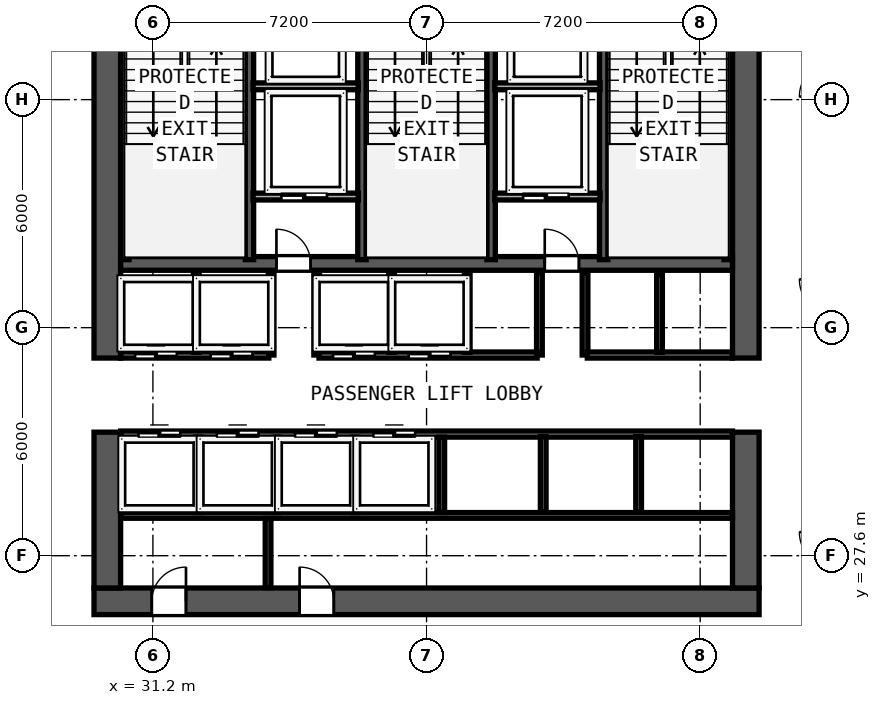
"""IFC4 building model, lengths in metres.
Left out: names, types, materials, properties, quantities, classifications, styles, units other than length and angle.
Written with IfcOpenShell. Run it as: python <this file> out.ifc"""

import sys

from ifc_helpers import new_model, si_unit, direction, frame, frame_2d, origin, place, context, subcontext, project, spatial, rectangle, extrude, element, fill, save


model = new_model("IFC4")
c1 = context("Model", 3, precision=1e-05, world=origin(), true_north=direction((0.0, 1.0)))
c2 = subcontext(c1, "Body", "Model", "MODEL_VIEW")
j1 = project(units=[si_unit("LENGTHUNIT", "METRE"), si_unit("PLANEANGLEUNIT", "RADIAN")], contexts=[c1])
p1 = place(None, origin())
s1 = spatial("IfcSite", under=j1, at=p1, CompositionType="ELEMENT")
p2 = place(p1, origin())
s2 = spatial("IfcBuilding", under=s1, at=p2, CompositionType="ELEMENT")
p3 = place(p2, frame((0.0, 0.0, 98.4)))
s3 = spatial("IfcBuildingStorey", under=s2, at=p3, CompositionType="ELEMENT", Elevation=98.4)
p4 = place(p3, frame((29.65, 26.4, 0.0), z_axis=(0.0, 0.0, 1.0), x_axis=(1.0, 0.0, 0.0)))
e1 = element("IfcWall", 1, at=p4, inside=s3, PredefinedType="SHEAR", context=c2, shape_type="SweptSolid", body=[
    extrude(rectangle(XDim=17.5, YDim=0.7, at=frame_2d((8.75, 0.0))), origin(), (0.0, 0.0, 1.0), 3.6),
])
p5 = place(p4, frame((2.42, 0.0, 0.0), z_axis=(0.0, 0.0, 1.0), x_axis=(-1.0, 0.0, 0.0)))
e2 = element("IfcOpeningElement", 2, at=p5, cuts=e1, PredefinedType="OPENING", context=c2, shape_type="SweptSolid", body=[
    extrude(rectangle(XDim=0.9, YDim=2.1, at=frame_2d((0.45, 1.05))), frame((0.0, 0.36, 0.0), z_axis=(0.0, -1.0, 0.0), x_axis=(1.0, 0.0, 0.0)), (0.0, 0.0, 1.0), 0.72),
])
p6 = place(p4, frame((6.31, 0.0, 0.0), z_axis=(0.0, 0.0, 1.0), x_axis=(-1.0, 0.0, 0.0)))
e3 = element("IfcOpeningElement", 3, at=p6, cuts=e1, PredefinedType="OPENING", context=c2, shape_type="SweptSolid", body=[
    extrude(rectangle(XDim=0.9, YDim=2.1, at=frame_2d((0.45, 1.05))), frame((0.0, 0.36, 0.0), z_axis=(0.0, -1.0, 0.0), x_axis=(1.0, 0.0, 0.0)), (0.0, 0.0, 1.0), 0.72),
])
p7 = place(p3, frame((30.0, 26.75, 0.0), z_axis=(0.0, 0.0, 1.0), x_axis=(0.0, 1.0, 0.0)))
e4 = element("IfcWall", 4, at=p7, inside=s3, PredefinedType="SHEAR", context=c2, shape_type="SweptSolid", body=[
    extrude(rectangle(XDim=4.1, YDim=0.7, at=frame_2d((2.05, 0.0))), origin(), (0.0, 0.0, 1.0), 3.6),
])
p8 = place(p3, frame((30.0, 32.8, 0.0), z_axis=(0.0, 0.0, 1.0), x_axis=(0.0, 1.0, 0.0)))
e5 = element("IfcWall", 5, at=p8, inside=s3, PredefinedType="SHEAR", context=c2, shape_type="SweptSolid", body=[
    extrude(rectangle(XDim=10.05, YDim=0.7, at=frame_2d((5.025, 0.0))), origin(), (0.0, 0.0, 1.0), 3.6),
])
p9 = place(p3, frame((46.8, 26.75, 0.0), z_axis=(0.0, 0.0, 1.0), x_axis=(0.0, 1.0, 0.0)))
e6 = element("IfcWall", 6, at=p9, inside=s3, PredefinedType="SHEAR", context=c2, shape_type="SweptSolid", body=[
    extrude(rectangle(XDim=4.1, YDim=0.7, at=frame_2d((2.05, 0.0))), origin(), (0.0, 0.0, 1.0), 3.6),
])
p10 = place(p3, frame((46.8, 32.8, 0.0), z_axis=(0.0, 0.0, 1.0), x_axis=(0.0, 1.0, 0.0)))
e7 = element("IfcWall", 7, at=p10, inside=s3, PredefinedType="SHEAR", context=c2, shape_type="SweptSolid", body=[
    extrude(rectangle(XDim=10.05, YDim=0.7, at=frame_2d((5.025, 0.0))), origin(), (0.0, 0.0, 1.0), 3.6),
])
p11 = place(p3, frame((30.35, 35.29, 0.0), z_axis=(0.0, 0.0, 1.0), x_axis=(1.0, 0.0, 0.0)))
e8 = element("IfcWall", 8, at=p11, inside=s3, PredefinedType="SHEAR", context=c2, shape_type="SweptSolid", body=[
    extrude(rectangle(XDim=16.1, YDim=0.36, at=frame_2d((8.05, 0.0))), origin(), (0.0, 0.0, 1.0), 3.6),
])
p12 = place(p11, frame((5.0, 0.0, 0.0), z_axis=(0.0, 0.0, 1.0), x_axis=(-1.0, 0.0, 0.0)))
e9 = element("IfcOpeningElement", 9, at=p12, cuts=e8, PredefinedType="OPENING", context=c2, shape_type="SweptSolid", body=[
    extrude(rectangle(XDim=0.9, YDim=2.1, at=frame_2d((0.45, 1.05))), frame((0.0, 0.19, 0.0), z_axis=(0.0, -1.0, 0.0), x_axis=(1.0, 0.0, 0.0)), (0.0, 0.0, 1.0), 0.38),
])
p13 = place(p11, frame((12.06, 0.0, 0.0), z_axis=(0.0, 0.0, 1.0), x_axis=(-1.0, 0.0, 0.0)))
e10 = element("IfcOpeningElement", 10, at=p13, cuts=e8, PredefinedType="OPENING", context=c2, shape_type="SweptSolid", body=[
    extrude(rectangle(XDim=0.9, YDim=2.1, at=frame_2d((0.45, 1.05))), frame((0.0, 0.19, 0.0), z_axis=(0.0, -1.0, 0.0), x_axis=(1.0, 0.0, 0.0)), (0.0, 0.0, 1.0), 0.38),
])
for number, where, z_axis, x_axis in (
    (11, (30.462, 35.39, 0.0), (0.0, 0.0, 1.0), (0.0, 1.0, 0.0)),
    (12, (33.74, 35.39, 0.0), (0.0, 0.0, 1.0), (0.0, 1.0, 0.0)),
    (13, (36.7, 35.39, 0.0), (0.0, 0.0, 1.0), (0.0, 1.0, 0.0)),
    (14, (40.1, 35.39, 0.0), (0.0, 0.0, 1.0), (0.0, 1.0, 0.0)),
    (15, (43.06, 35.39, 0.0), (0.0, 0.0, 1.0), (0.0, 1.0, 0.0)),
    (16, (46.338, 35.39, 0.0), (0.0, 0.0, 1.0), (0.0, 1.0, 0.0)),
):
    element("IfcWall", number, at=place(p3, frame(where, z_axis=z_axis, x_axis=x_axis)), inside=s3, PredefinedType="SHEAR", context=c2, shape_type="SweptSolid", body=[
        extrude(rectangle(XDim=7.46, YDim=0.22, at=frame_2d((3.73, 0.0))), origin(), (0.0, 0.0, 1.0), 3.6),
    ])
for number, where, z_axis, x_axis in (
    (17, (33.835, 39.95, 0.0), (0.0, 0.0, 1.0), (1.0, 0.0, 0.0)),
    (18, (40.195, 39.95, 0.0), (0.0, 0.0, 1.0), (1.0, 0.0, 0.0)),
):
    element("IfcWall", number, at=place(p3, frame(where, z_axis=z_axis, x_axis=x_axis)), inside=s3, PredefinedType="SOLIDWALL", context=c2, shape_type="SweptSolid", body=[
        extrude(rectangle(XDim=2.77, YDim=0.18, at=frame_2d((1.385, 0.0))), origin(), (0.0, 0.0, 1.0), 3.6),
    ])
p14 = place(p3, frame((33.835, 37.05, 0.0), z_axis=(0.0, 0.0, 1.0), x_axis=(1.0, 0.0, 0.0)))
e19 = element("IfcWall", 19, at=p14, inside=s3, PredefinedType="SOLIDWALL", context=c2, shape_type="SweptSolid", body=[
    extrude(rectangle(XDim=2.77, YDim=0.18, at=frame_2d((1.385, 0.0))), origin(), (0.0, 0.0, 1.0), 3.6),
])
p15 = place(p14, frame((1.945, 0.0, 0.0), z_axis=(0.0, 0.0, 1.0), x_axis=(-1.0, 0.0, 0.0)))
e20 = element("IfcOpeningElement", 20, at=p15, cuts=e19, PredefinedType="OPENING", context=c2, shape_type="SweptSolid", body=[
    extrude(rectangle(XDim=1.2, YDim=2.2, at=frame_2d((0.6, 1.1))), frame((0.0, 0.1, 0.0), z_axis=(0.0, -1.0, 0.0), x_axis=(1.0, 0.0, 0.0)), (0.0, 0.0, 1.0), 0.2),
])
for number, where, z_axis, x_axis in (
    (21, (34.31, 32.88, 0.0), (0.0, 0.0, 1.0), (0.0, 1.0, 0.0)),
    (22, (35.51, 32.88, 0.0), (0.0, 0.0, 1.0), (0.0, 1.0, 0.0)),
):
    element("IfcWall", number, at=place(p3, frame(where, z_axis=z_axis, x_axis=x_axis)), inside=s3, PredefinedType="SOLIDWALL", context=c2, shape_type="SweptSolid", body=[
        extrude(rectangle(XDim=2.17, YDim=0.15, at=frame_2d((1.085, 0.0))), origin(), (0.0, 0.0, 1.0), 3.6),
    ])
p16 = place(p3, frame((40.195, 37.05, 0.0), z_axis=(0.0, 0.0, 1.0), x_axis=(1.0, 0.0, 0.0)))
e23 = element("IfcWall", 23, at=p16, inside=s3, PredefinedType="SOLIDWALL", context=c2, shape_type="SweptSolid", body=[
    extrude(rectangle(XDim=2.77, YDim=0.18, at=frame_2d((1.385, 0.0))), origin(), (0.0, 0.0, 1.0), 3.6),
])
p17 = place(p16, frame((1.945, 0.0, 0.0), z_axis=(0.0, 0.0, 1.0), x_axis=(-1.0, 0.0, 0.0)))
e24 = element("IfcOpeningElement", 24, at=p17, cuts=e23, PredefinedType="OPENING", context=c2, shape_type="SweptSolid", body=[
    extrude(rectangle(XDim=1.2, YDim=2.2, at=frame_2d((0.6, 1.1))), frame((0.0, 0.1, 0.0), z_axis=(0.0, -1.0, 0.0), x_axis=(1.0, 0.0, 0.0)), (0.0, 0.0, 1.0), 0.2),
])
for number, where, z_axis, x_axis in (
    (25, (41.37, 32.88, 0.0), (0.0, 0.0, 1.0), (0.0, 1.0, 0.0)),
    (26, (42.57, 32.88, 0.0), (0.0, 0.0, 1.0), (0.0, 1.0, 0.0)),
):
    element("IfcWall", number, at=place(p3, frame(where, z_axis=z_axis, x_axis=x_axis)), inside=s3, PredefinedType="SOLIDWALL", context=c2, shape_type="SweptSolid", body=[
        extrude(rectangle(XDim=2.17, YDim=0.15, at=frame_2d((1.085, 0.0))), origin(), (0.0, 0.0, 1.0), 3.6),
    ])
p18 = place(p3, frame((30.35, 32.88, 0.0), z_axis=(0.0, 0.0, 1.0), x_axis=(1.0, 0.0, 0.0)))
e27 = element("IfcWall", 27, at=p18, inside=s3, PredefinedType="SOLIDWALL", context=c2, shape_type="SweptSolid", body=[
    extrude(rectangle(XDim=3.9, YDim=0.16, at=frame_2d((1.95, 0.0))), origin(), (0.0, 0.0, 1.0), 3.6),
])
p19 = place(p18, frame((1.48, 0.0, 0.0), z_axis=(0.0, 0.0, 1.0), x_axis=(-1.0, 0.0, 0.0)))
e28 = element("IfcOpeningElement", 28, at=p19, cuts=e27, PredefinedType="OPENING", context=c2, shape_type="SweptSolid", body=[
    extrude(rectangle(XDim=1.1, YDim=2.2, at=frame_2d((0.55, 1.1))), frame((0.0, 0.09, 0.0), z_axis=(0.0, -1.0, 0.0), x_axis=(1.0, 0.0, 0.0)), (0.0, 0.0, 1.0), 0.18),
])
p20 = place(p18, frame((3.47, 0.0, 0.0), z_axis=(0.0, 0.0, 1.0), x_axis=(-1.0, 0.0, 0.0)))
e29 = element("IfcOpeningElement", 29, at=p20, cuts=e27, PredefinedType="OPENING", context=c2, shape_type="SweptSolid", body=[
    extrude(rectangle(XDim=1.1, YDim=2.2, at=frame_2d((0.55, 1.1))), frame((0.0, 0.09, 0.0), z_axis=(0.0, -1.0, 0.0), x_axis=(1.0, 0.0, 0.0)), (0.0, 0.0, 1.0), 0.18),
])
p21 = place(p3, frame((35.57, 32.88, 0.0), z_axis=(0.0, 0.0, 1.0), x_axis=(1.0, 0.0, 0.0)))
e30 = element("IfcWall", 30, at=p21, inside=s3, PredefinedType="SOLIDWALL", context=c2, shape_type="SweptSolid", body=[
    extrude(rectangle(XDim=5.74, YDim=0.16, at=frame_2d((2.87, 0.0))), origin(), (0.0, 0.0, 1.0), 3.6),
])
p22 = place(p21, frame((1.47, 0.0, 0.0), z_axis=(0.0, 0.0, 1.0), x_axis=(-1.0, 0.0, 0.0)))
e31 = element("IfcOpeningElement", 31, at=p22, cuts=e30, PredefinedType="OPENING", context=c2, shape_type="SweptSolid", body=[
    extrude(rectangle(XDim=1.1, YDim=2.2, at=frame_2d((0.55, 1.1))), frame((0.0, 0.09, 0.0), z_axis=(0.0, -1.0, 0.0), x_axis=(1.0, 0.0, 0.0)), (0.0, 0.0, 1.0), 0.18),
])
p23 = place(p21, frame((3.46, 0.0, 0.0), z_axis=(0.0, 0.0, 1.0), x_axis=(-1.0, 0.0, 0.0)))
e32 = element("IfcOpeningElement", 32, at=p23, cuts=e30, PredefinedType="OPENING", context=c2, shape_type="SweptSolid", body=[
    extrude(rectangle(XDim=1.1, YDim=2.2, at=frame_2d((0.55, 1.1))), frame((0.0, 0.09, 0.0), z_axis=(0.0, -1.0, 0.0), x_axis=(1.0, 0.0, 0.0)), (0.0, 0.0, 1.0), 0.18),
])
p24 = place(p3, frame((42.63, 32.88, 0.0), z_axis=(0.0, 0.0, 1.0), x_axis=(1.0, 0.0, 0.0)))
e33 = element("IfcWall", 33, at=p24, inside=s3, PredefinedType="SOLIDWALL", context=c2, shape_type="SweptSolid", body=[
    extrude(rectangle(XDim=3.82, YDim=0.16, at=frame_2d((1.91, 0.0))), origin(), (0.0, 0.0, 1.0), 3.6),
])
for number, where, z_axis, x_axis in (
    (34, (32.34, 32.95, 0.0), (0.0, 0.0, 1.0), (0.0, 1.0, 0.0)),
    (35, (37.48, 32.95, 0.0), (0.0, 0.0, 1.0), (0.0, 1.0, 0.0)),
    (36, (39.47, 32.95, 0.0), (0.0, 0.0, 1.0), (0.0, 1.0, 0.0)),
    (37, (44.53, 32.95, 0.0), (0.0, 0.0, 1.0), (0.0, 1.0, 0.0)),
):
    element("IfcWall", number, at=place(p3, frame(where, z_axis=z_axis, x_axis=x_axis)), inside=s3, PredefinedType="SOLIDWALL", context=c2, shape_type="SweptSolid", body=[
        extrude(rectangle(XDim=2.05, YDim=0.15, at=frame_2d((1.025, 0.0))), origin(), (0.0, 0.0, 1.0), 3.6),
    ])
p25 = place(p3, frame((30.35, 30.8, 0.0), z_axis=(0.0, 0.0, 1.0), x_axis=(1.0, 0.0, 0.0)))
e38 = element("IfcWall", 38, at=p25, inside=s3, PredefinedType="SOLIDWALL", context=c2, shape_type="SweptSolid", body=[
    extrude(rectangle(XDim=16.1, YDim=0.16, at=frame_2d((8.05, 0.0))), origin(), (0.0, 0.0, 1.0), 3.6),
])
p26 = place(p25, frame((0.47, 0.0, 0.0)))
e39 = element("IfcOpeningElement", 39, at=p26, cuts=e38, PredefinedType="OPENING", context=c2, shape_type="SweptSolid", body=[
    extrude(rectangle(XDim=1.1, YDim=2.2, at=frame_2d((0.55, 1.1))), frame((0.0, 0.09, 0.0), z_axis=(0.0, -1.0, 0.0), x_axis=(1.0, 0.0, 0.0)), (0.0, 0.0, 1.0), 0.18),
])
p27 = place(p25, frame((2.53, 0.0, 0.0)))
e40 = element("IfcOpeningElement", 40, at=p27, cuts=e38, PredefinedType="OPENING", context=c2, shape_type="SweptSolid", body=[
    extrude(rectangle(XDim=1.1, YDim=2.2, at=frame_2d((0.55, 1.1))), frame((0.0, 0.09, 0.0), z_axis=(0.0, -1.0, 0.0), x_axis=(1.0, 0.0, 0.0)), (0.0, 0.0, 1.0), 0.18),
])
p28 = place(p25, frame((4.59, 0.0, 0.0)))
e41 = element("IfcOpeningElement", 41, at=p28, cuts=e38, PredefinedType="OPENING", context=c2, shape_type="SweptSolid", body=[
    extrude(rectangle(XDim=1.1, YDim=2.2, at=frame_2d((0.55, 1.1))), frame((0.0, 0.09, 0.0), z_axis=(0.0, -1.0, 0.0), x_axis=(1.0, 0.0, 0.0)), (0.0, 0.0, 1.0), 0.18),
])
p29 = place(p25, frame((6.65, 0.0, 0.0)))
e42 = element("IfcOpeningElement", 42, at=p29, cuts=e38, PredefinedType="OPENING", context=c2, shape_type="SweptSolid", body=[
    extrude(rectangle(XDim=1.1, YDim=2.2, at=frame_2d((0.55, 1.1))), frame((0.0, 0.09, 0.0), z_axis=(0.0, -1.0, 0.0), x_axis=(1.0, 0.0, 0.0)), (0.0, 0.0, 1.0), 0.18),
])
p30 = place(p3, frame((30.35, 28.66, 0.0), z_axis=(0.0, 0.0, 1.0), x_axis=(1.0, 0.0, 0.0)))
e43 = element("IfcWall", 43, at=p30, inside=s3, PredefinedType="PARTITIONING", context=c2, shape_type="SweptSolid", body=[
    extrude(rectangle(XDim=16.1, YDim=0.15, at=frame_2d((8.05, 0.0))), origin(), (0.0, 0.0, 1.0), 3.6),
])
for number, where, z_axis, x_axis in (
    (44, (32.4, 28.735, 0.0), (0.0, 0.0, 1.0), (0.0, 1.0, 0.0)),
    (45, (34.46, 28.735, 0.0), (0.0, 0.0, 1.0), (0.0, 1.0, 0.0)),
    (46, (36.52, 28.735, 0.0), (0.0, 0.0, 1.0), (0.0, 1.0, 0.0)),
    (47, (38.8, 28.735, 0.0), (0.0, 0.0, 1.0), (0.0, 1.0, 0.0)),
):
    element("IfcWall", number, at=place(p3, frame(where, z_axis=z_axis, x_axis=x_axis)), inside=s3, PredefinedType="SOLIDWALL", context=c2, shape_type="SweptSolid", body=[
        extrude(rectangle(XDim=1.985, YDim=0.15, at=frame_2d((0.992, 0.0))), origin(), (0.0, 0.0, 1.0), 3.6),
    ])
p31 = place(p3, frame((34.23, 26.76, 0.0), z_axis=(0.0, 0.0, 1.0), x_axis=(0.0, 1.0, 0.0)))
e48 = element("IfcWall", 48, at=p31, inside=s3, PredefinedType="PARTITIONING", context=c2, shape_type="SweptSolid", body=[
    extrude(rectangle(XDim=1.82, YDim=0.15, at=frame_2d((0.91, 0.0))), origin(), (0.0, 0.0, 1.0), 3.6),
])
for number, where, z_axis, x_axis in (
    (49, (41.47, 28.75, 0.0), (0.0, 0.0, 1.0), (0.0, 1.0, 0.0)),
    (50, (43.98, 28.75, 0.0), (0.0, 0.0, 1.0), (0.0, 1.0, 0.0)),
):
    element("IfcWall", number, at=place(p3, frame(where, z_axis=z_axis, x_axis=x_axis)), inside=s3, PredefinedType="SOLIDWALL", context=c2, shape_type="SweptSolid", body=[
        extrude(rectangle(XDim=1.985, YDim=0.15, at=frame_2d((0.993, 0.0))), origin(), (0.0, 0.0, 1.0), 3.6),
    ])
p32 = place(p15, origin())
e51 = element("IfcDoor", 51, at=p32, inside=s3, OperationType="SLIDING_TO_RIGHT", PredefinedType="DOOR", context=c2, shape_type="SweptSolid", body=[
    extrude(rectangle(XDim=1.2, YDim=2.2, at=frame_2d((0.6, 1.1))), frame((0.0, 0.025, 0.0), z_axis=(0.0, -1.0, 0.0), x_axis=(1.0, 0.0, 0.0)), (0.0, 0.0, 1.0), 0.05),
])
fill(e20, e51)
p33 = place(p12, origin())
e52 = element("IfcDoor", 52, at=p33, inside=s3, OperationType="SINGLE_SWING_RIGHT", PredefinedType="DOOR", context=c2, shape_type="SweptSolid", body=[
    extrude(rectangle(XDim=0.9, YDim=2.1, at=frame_2d((0.45, 1.05))), frame((0.0, 0.025, 0.0), z_axis=(0.0, -1.0, 0.0), x_axis=(1.0, 0.0, 0.0)), (0.0, 0.0, 1.0), 0.05),
])
fill(e9, e52)
p34 = place(p17, origin())
e53 = element("IfcDoor", 53, at=p34, inside=s3, OperationType="SLIDING_TO_RIGHT", PredefinedType="DOOR", context=c2, shape_type="SweptSolid", body=[
    extrude(rectangle(XDim=1.2, YDim=2.2, at=frame_2d((0.6, 1.1))), frame((0.0, 0.025, 0.0), z_axis=(0.0, -1.0, 0.0), x_axis=(1.0, 0.0, 0.0)), (0.0, 0.0, 1.0), 0.05),
])
fill(e24, e53)
p35 = place(p13, origin())
e54 = element("IfcDoor", 54, at=p35, inside=s3, OperationType="SINGLE_SWING_RIGHT", PredefinedType="DOOR", context=c2, shape_type="SweptSolid", body=[
    extrude(rectangle(XDim=0.9, YDim=2.1, at=frame_2d((0.45, 1.05))), frame((0.0, 0.025, 0.0), z_axis=(0.0, -1.0, 0.0), x_axis=(1.0, 0.0, 0.0)), (0.0, 0.0, 1.0), 0.05),
])
fill(e10, e54)
p36 = place(p19, origin())
e55 = element("IfcDoor", 55, at=p36, inside=s3, OperationType="SLIDING_TO_LEFT", PredefinedType="DOOR", context=c2, shape_type="SweptSolid", body=[
    extrude(rectangle(XDim=1.1, YDim=2.2, at=frame_2d((0.55, 1.1))), frame((0.0, 0.025, 0.0), z_axis=(0.0, -1.0, 0.0), x_axis=(1.0, 0.0, 0.0)), (0.0, 0.0, 1.0), 0.05),
])
fill(e28, e55)
p37 = place(p20, origin())
e56 = element("IfcDoor", 56, at=p37, inside=s3, OperationType="SLIDING_TO_LEFT", PredefinedType="DOOR", context=c2, shape_type="SweptSolid", body=[
    extrude(rectangle(XDim=1.1, YDim=2.2, at=frame_2d((0.55, 1.1))), frame((0.0, 0.025, 0.0), z_axis=(0.0, -1.0, 0.0), x_axis=(1.0, 0.0, 0.0)), (0.0, 0.0, 1.0), 0.05),
])
fill(e29, e56)
p38 = place(p22, origin())
e57 = element("IfcDoor", 57, at=p38, inside=s3, OperationType="SLIDING_TO_LEFT", PredefinedType="DOOR", context=c2, shape_type="SweptSolid", body=[
    extrude(rectangle(XDim=1.1, YDim=2.2, at=frame_2d((0.55, 1.1))), frame((0.0, 0.025, 0.0), z_axis=(0.0, -1.0, 0.0), x_axis=(1.0, 0.0, 0.0)), (0.0, 0.0, 1.0), 0.05),
])
fill(e31, e57)
p39 = place(p23, origin())
e58 = element("IfcDoor", 58, at=p39, inside=s3, OperationType="SLIDING_TO_LEFT", PredefinedType="DOOR", context=c2, shape_type="SweptSolid", body=[
    extrude(rectangle(XDim=1.1, YDim=2.2, at=frame_2d((0.55, 1.1))), frame((0.0, 0.025, 0.0), z_axis=(0.0, -1.0, 0.0), x_axis=(1.0, 0.0, 0.0)), (0.0, 0.0, 1.0), 0.05),
])
fill(e32, e58)
p40 = place(p26, origin())
e59 = element("IfcDoor", 59, at=p40, inside=s3, OperationType="SLIDING_TO_LEFT", PredefinedType="DOOR", context=c2, shape_type="SweptSolid", body=[
    extrude(rectangle(XDim=1.1, YDim=2.2, at=frame_2d((0.55, 1.1))), frame((0.0, 0.025, 0.0), z_axis=(0.0, -1.0, 0.0), x_axis=(1.0, 0.0, 0.0)), (0.0, 0.0, 1.0), 0.05),
])
fill(e39, e59)
p41 = place(p27, origin())
e60 = element("IfcDoor", 60, at=p41, inside=s3, OperationType="SLIDING_TO_LEFT", PredefinedType="DOOR", context=c2, shape_type="SweptSolid", body=[
    extrude(rectangle(XDim=1.1, YDim=2.2, at=frame_2d((0.55, 1.1))), frame((0.0, 0.025, 0.0), z_axis=(0.0, -1.0, 0.0), x_axis=(1.0, 0.0, 0.0)), (0.0, 0.0, 1.0), 0.05),
])
fill(e40, e60)
p42 = place(p28, origin())
e61 = element("IfcDoor", 61, at=p42, inside=s3, OperationType="SLIDING_TO_LEFT", PredefinedType="DOOR", context=c2, shape_type="SweptSolid", body=[
    extrude(rectangle(XDim=1.1, YDim=2.2, at=frame_2d((0.55, 1.1))), frame((0.0, 0.025, 0.0), z_axis=(0.0, -1.0, 0.0), x_axis=(1.0, 0.0, 0.0)), (0.0, 0.0, 1.0), 0.05),
])
fill(e41, e61)
p43 = place(p29, origin())
e62 = element("IfcDoor", 62, at=p43, inside=s3, OperationType="SLIDING_TO_LEFT", PredefinedType="DOOR", context=c2, shape_type="SweptSolid", body=[
    extrude(rectangle(XDim=1.1, YDim=2.2, at=frame_2d((0.55, 1.1))), frame((0.0, 0.025, 0.0), z_axis=(0.0, -1.0, 0.0), x_axis=(1.0, 0.0, 0.0)), (0.0, 0.0, 1.0), 0.05),
])
fill(e42, e62)
p44 = place(p5, origin())
e63 = element("IfcDoor", 63, at=p44, inside=s3, OperationType="SINGLE_SWING_LEFT", PredefinedType="DOOR", context=c2, shape_type="SweptSolid", body=[
    extrude(rectangle(XDim=0.9, YDim=2.1, at=frame_2d((0.45, 1.05))), frame((0.0, -0.195, 0.0), z_axis=(0.0, -1.0, 0.0), x_axis=(1.0, 0.0, 0.0)), (0.0, 0.0, 1.0), 0.05),
])
fill(e2, e63)
p45 = place(p6, origin())
e64 = element("IfcDoor", 64, at=p45, inside=s3, OperationType="SINGLE_SWING_RIGHT", PredefinedType="DOOR", context=c2, shape_type="SweptSolid", body=[
    extrude(rectangle(XDim=0.9, YDim=2.1, at=frame_2d((0.45, 1.05))), frame((0.0, -0.195, 0.0), z_axis=(0.0, -1.0, 0.0), x_axis=(1.0, 0.0, 0.0)), (0.0, 0.0, 1.0), 0.05),
])
fill(e3, e64)
save(model, sys.argv[1])
